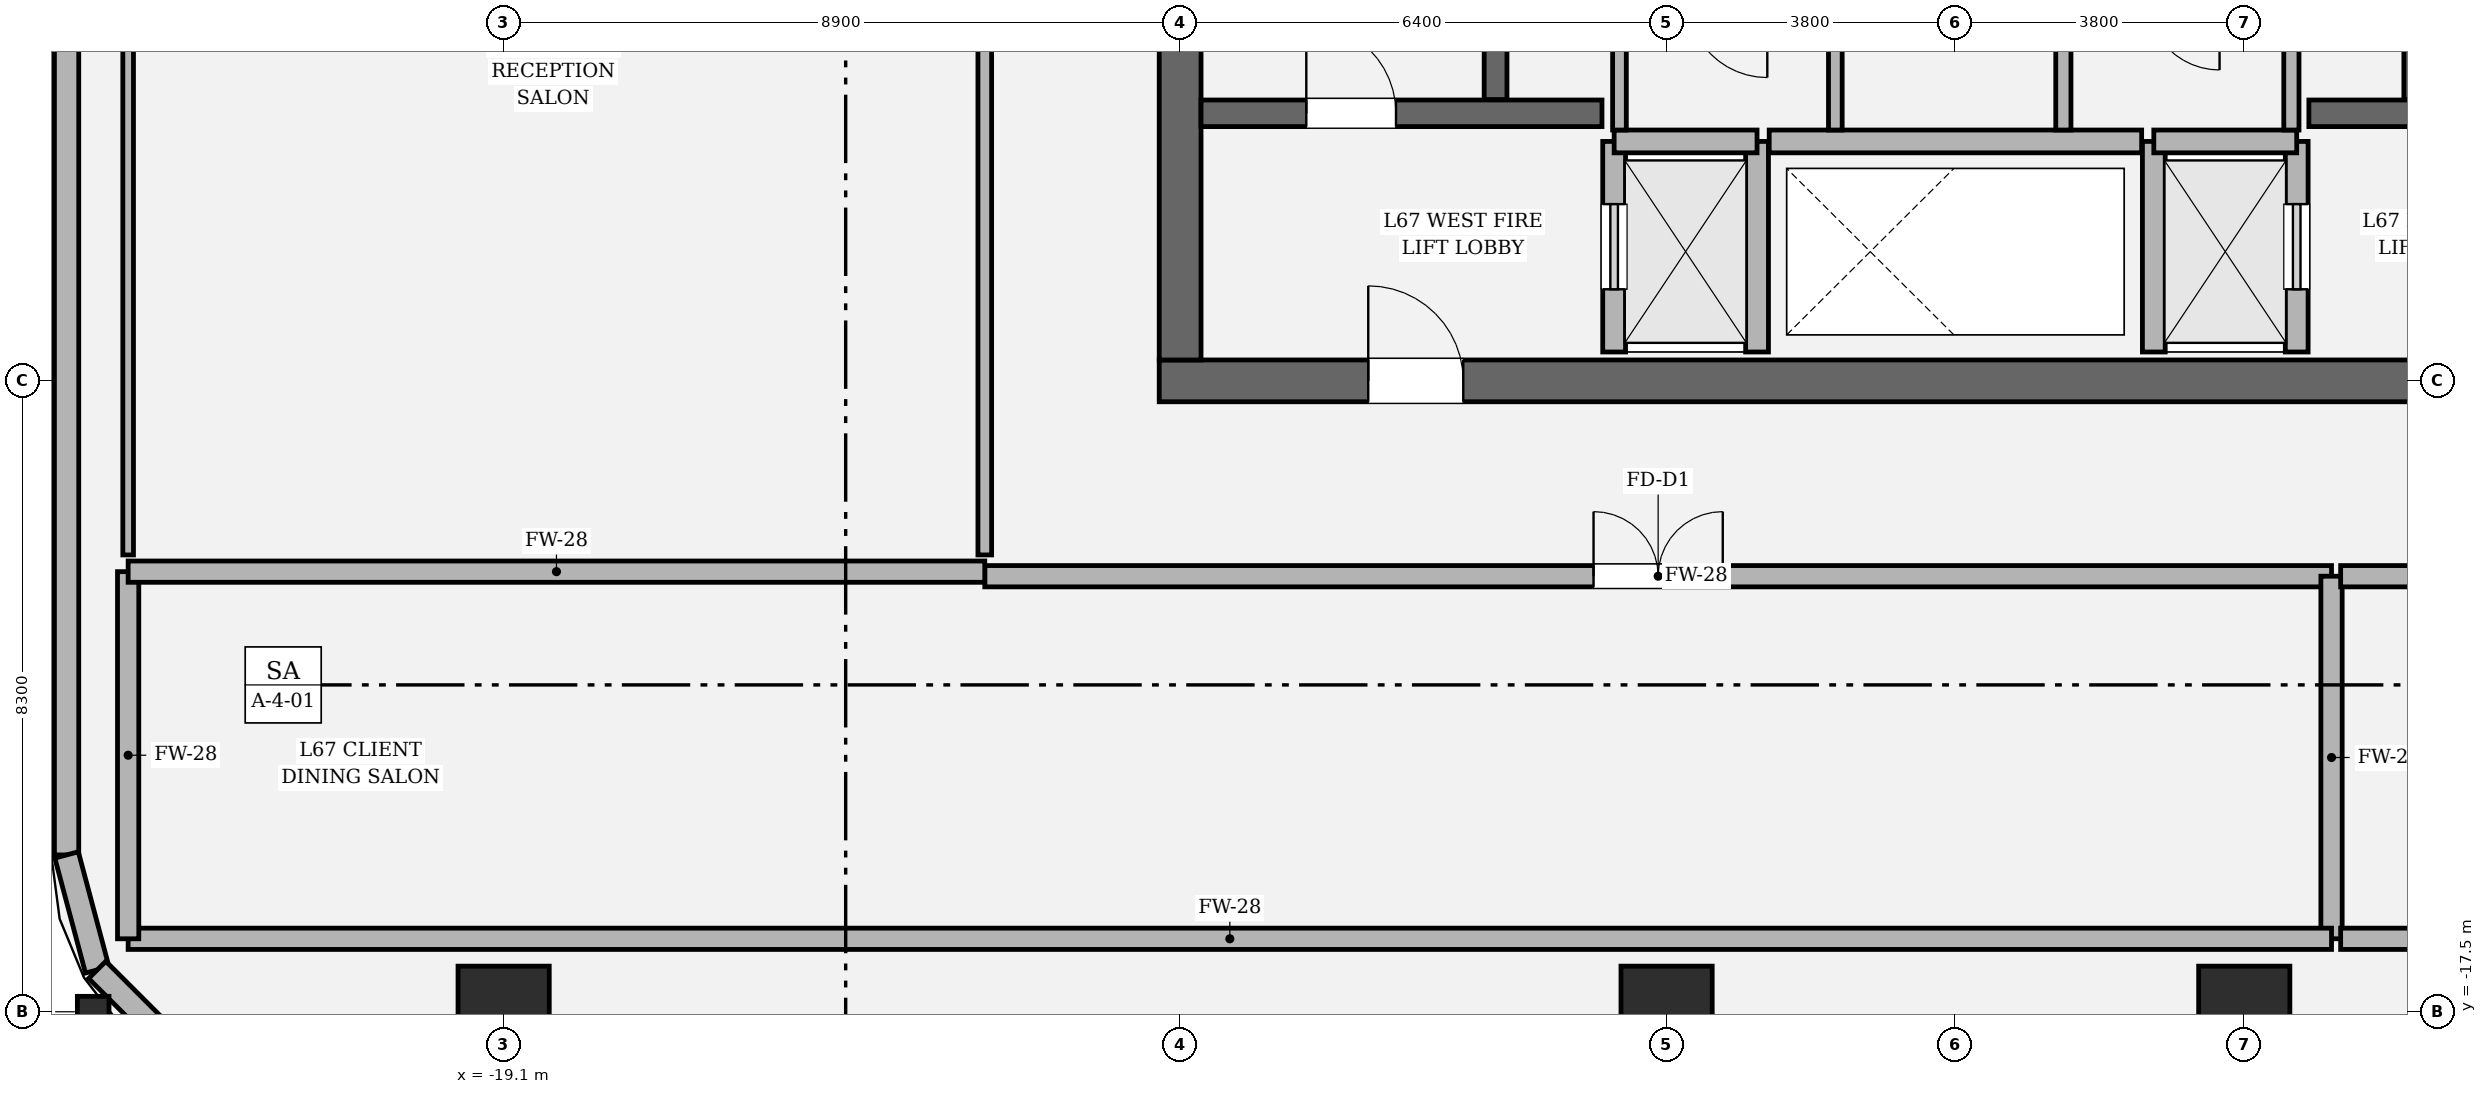
"""IFC4 building model, lengths in metres.
Left out: names, types, materials, properties, quantities, classifications, styles, units other than length and angle.
Written with IfcOpenShell. Run it as: python <this file> out.ifc"""

import sys

from ifc_helpers import new_model, si_unit, direction, frame, frame_2d, origin, origin_2d, place, context, subcontext, project, spatial, rectangle, hollow_rectangle, i_section, extrude, element, fill, save


model = new_model("IFC4")
c1 = context("Model", 3, precision=1e-05, world=origin(), true_north=direction((0.0, 1.0)))
c2 = subcontext(c1, "Body", "Model", "MODEL_VIEW")
j1 = project(units=[si_unit("LENGTHUNIT", "METRE"), si_unit("PLANEANGLEUNIT", "RADIAN")], contexts=[c1])
p1 = place(None, origin())
s1 = spatial("IfcSite", under=j1, at=p1, CompositionType="ELEMENT")
p2 = place(p1, origin())
s2 = spatial("IfcBuilding", under=s1, at=p2, CompositionType="ELEMENT")
p3 = place(p2, frame((0.0, 0.0, 283.8)))
s3 = spatial("IfcBuildingStorey", under=s2, at=p3, CompositionType="ELEMENT", Elevation=283.8)
p4 = place(p3, frame((10.475, -9.2, 0.0), z_axis=(0.0, 0.0, 1.0), x_axis=(-1.0, 0.0, 0.0)))
e1 = element("IfcWall", 1, at=p4, inside=s3, PredefinedType="SHEAR", context=c2, shape_type="SweptSolid", body=[
    extrude(rectangle(XDim=20.95, YDim=0.55, at=frame_2d((10.475, 0.0))), origin(), (0.0, 0.0, 1.0), 4.2),
])
p5 = place(p4, frame((2.75, 0.0, 0.0)))
e2 = element("IfcOpeningElement", 2, at=p5, cuts=e1, PredefinedType="OPENING", context=c2, shape_type="SweptSolid", body=[
    extrude(rectangle(XDim=1.25, YDim=2.25, at=frame_2d((0.625, 1.125))), frame((0.0, 0.285, 0.0), z_axis=(0.0, -1.0, 0.0), x_axis=(1.0, 0.0, 0.0)), (0.0, 0.0, 1.0), 0.57),
])
p6 = place(p4, frame((16.95, 0.0, 0.0)))
e3 = element("IfcOpeningElement", 3, at=p6, cuts=e1, PredefinedType="OPENING", context=c2, shape_type="SweptSolid", body=[
    extrude(rectangle(XDim=1.25, YDim=2.25, at=frame_2d((0.625, 1.125))), frame((0.0, 0.285, 0.0), z_axis=(0.0, -1.0, 0.0), x_axis=(1.0, 0.0, 0.0)), (0.0, 0.0, 1.0), 0.57),
])
p7 = place(p3, frame((-10.2, -8.925, 0.0), z_axis=(0.0, 0.0, 1.0), x_axis=(0.0, 1.0, 0.0)))
e4 = element("IfcWall", 4, at=p7, inside=s3, PredefinedType="SHEAR", context=c2, shape_type="SweptSolid", body=[
    extrude(rectangle(XDim=17.85, YDim=0.55, at=frame_2d((8.925, 0.0))), origin(), (0.0, 0.0, 1.0), 4.2),
])
p8 = place(p7, frame((12.715, 0.0, 0.0)))
e5 = element("IfcOpeningElement", 5, at=p8, cuts=e4, PredefinedType="OPENING", context=c2, shape_type="SweptSolid", body=[
    extrude(rectangle(XDim=1.18, YDim=2.2, at=frame_2d((0.59, 1.1))), frame((0.0, 0.285, 0.0), z_axis=(0.0, -1.0, 0.0), x_axis=(1.0, 0.0, 0.0)), (0.0, 0.0, 1.0), 0.57),
])
for number, where, z_axis, x_axis in (
    (6, (-6.05, -5.5, 0.0), (0.0, 0.0, 1.0), (0.0, 1.0, 0.0)),
    (7, (6.05, 3.45, 0.0), (0.0, 0.0, 1.0), (0.0, -1.0, 0.0)),
):
    element("IfcWall", number, at=place(p3, frame(where, z_axis=z_axis, x_axis=x_axis)), inside=s3, PredefinedType="SOLIDWALL", context=c2, shape_type="SweptSolid", body=[
        extrude(rectangle(XDim=8.95, YDim=0.3, at=frame_2d((4.475, 0.0))), origin(), (0.0, 0.0, 1.0), 4.2),
    ])
p9 = place(p3, frame((-9.925, -5.68, 0.0), z_axis=(0.0, 0.0, 1.0), x_axis=(1.0, 0.0, 0.0)))
e8 = element("IfcWall", 8, at=p9, inside=s3, PredefinedType="SOLIDWALL", context=c2, shape_type="SweptSolid", body=[
    extrude(rectangle(XDim=5.275, YDim=0.35, at=frame_2d((2.638, 0.0))), origin(), (0.0, 0.0, 1.0), 4.2),
])
p10 = place(p9, frame((1.385, 0.0, 0.0)))
e9 = element("IfcOpeningElement", 9, at=p10, cuts=e8, PredefinedType="OPENING", context=c2, shape_type="SweptSolid", body=[
    extrude(rectangle(XDim=1.18, YDim=2.2, at=frame_2d((0.59, 1.1))), frame((0.0, 0.185, 0.0), z_axis=(0.0, -1.0, 0.0), x_axis=(1.0, 0.0, 0.0)), (0.0, 0.0, 1.0), 0.37),
])
p11 = place(p3, frame((4.65, -5.68, 0.0), z_axis=(0.0, 0.0, 1.0), x_axis=(1.0, 0.0, 0.0)))
e10 = element("IfcWall", 10, at=p11, inside=s3, PredefinedType="SOLIDWALL", context=c2, shape_type="SweptSolid", body=[
    extrude(rectangle(XDim=5.275, YDim=0.35, at=frame_2d((2.638, 0.0))), origin(), (0.0, 0.0, 1.0), 4.2),
])
p12 = place(p11, frame((2.71, 0.0, 0.0)))
e11 = element("IfcOpeningElement", 11, at=p12, cuts=e10, PredefinedType="OPENING", context=c2, shape_type="SweptSolid", body=[
    extrude(rectangle(XDim=1.18, YDim=2.2, at=frame_2d((0.59, 1.1))), frame((0.0, 0.185, 0.0), z_axis=(0.0, -1.0, 0.0), x_axis=(1.0, 0.0, 0.0)), (0.0, 0.0, 1.0), 0.37),
])
for number, where, z_axis, x_axis in (
    (12, (-19.1, -17.5, 0.0), (0.0, 0.0, 1.0), (1.0, 0.0, 0.0)),
    (13, (-3.8, -17.5, 0.0), (0.0, 0.0, 1.0), (1.0, 0.0, 0.0)),
    (14, (3.8, -17.5, 0.0), (0.0, 0.0, 1.0), (1.0, 0.0, 0.0)),
):
    element("IfcColumn", number, at=place(p3, frame(where, z_axis=z_axis, x_axis=x_axis)), inside=s3, PredefinedType="COLUMN", context=c2, shape_type="SweptSolid", body=[
        extrude(hollow_rectangle(XDim=1.2, YDim=1.2, WallThickness=0.035, at=origin_2d()), origin(), (0.0, 0.0, 1.0), 4.2),
    ])
p13 = place(p3, frame((-24.5, -17.5, 0.0), z_axis=(0.0, 0.0, 1.0), x_axis=(0.0, 1.0, 0.0)))
e15 = element("IfcColumn", 15, at=p13, inside=s3, PredefinedType="COLUMN", context=c2, shape_type="SweptSolid", body=[
    extrude(i_section(OverallWidth=0.406, OverallDepth=0.416, WebThickness=0.029, FlangeThickness=0.048, FilletRadius=0.018, at=origin_2d()), origin(), (0.0, 0.0, 1.0), 4.198),
])
p14 = place(p3, frame((-24.85, -2.75, 0.0), z_axis=(0.0, 0.0, 1.0), x_axis=(0.0, -1.0, 0.0)))
e16 = element("IfcWall", 16, at=p14, inside=s3, PredefinedType="SOLIDWALL", context=c2, shape_type="SweptSolid", body=[
    extrude(rectangle(XDim=12.687, YDim=0.32, at=frame_2d((6.344, 0.0))), origin(), (0.0, 0.0, 1.0), 2.714),
])
p15 = place(p3, frame((-24.85, -15.437, 0.0), z_axis=(0.0, 0.0, 1.0), x_axis=(0.257847112249, -0.966185730957, 0.0)))
e17 = element("IfcWall", 17, at=p15, inside=s3, PredefinedType="SOLIDWALL", context=c2, shape_type="SweptSolid", body=[
    extrude(rectangle(XDim=1.565, YDim=0.32, at=frame_2d((0.783, 0.0))), origin(), (0.0, 0.0, 1.0), 2.714),
])
p16 = place(p3, frame((-24.447, -16.949, 0.0), z_axis=(0.0, 0.0, 1.0), x_axis=(0.707106781187, -0.707106781187, 0.0)))
e18 = element("IfcWall", 18, at=p16, inside=s3, PredefinedType="SOLIDWALL", context=c2, shape_type="SweptSolid", body=[
    extrude(rectangle(XDim=1.552, YDim=0.32, at=frame_2d((0.776, 0.0))), origin(), (0.0, 0.0, 1.0), 2.674),
])
p17 = place(p3, frame((-4.49, -8.82, 0.0), z_axis=(0.0, 0.0, 1.0), x_axis=(0.0, 1.0, 0.0)))
e19 = element("IfcWall", 19, at=p17, inside=s3, PredefinedType="SOLIDWALL", context=c2, shape_type="SweptSolid", body=[
    extrude(rectangle(XDim=2.77, YDim=0.3, at=frame_2d((1.385, 0.0))), origin(), (0.0, 0.0, 1.0), 4.0),
])
p18 = place(p17, frame((0.825, 0.0, 0.0)))
e20 = element("IfcOpeningElement", 20, at=p18, cuts=e19, PredefinedType="OPENING", context=c2, shape_type="SweptSolid", body=[
    extrude(rectangle(XDim=1.12, YDim=2.25, at=frame_2d((0.56, 1.125))), frame((0.0, 0.16, 0.0), z_axis=(0.0, -1.0, 0.0), x_axis=(1.0, 0.0, 0.0)), (0.0, 0.0, 1.0), 0.32),
])
p19 = place(p3, frame((-2.61, -8.82, 0.0), z_axis=(0.0, 0.0, 1.0), x_axis=(0.0, 1.0, 0.0)))
e21 = element("IfcWall", 21, at=p19, inside=s3, PredefinedType="SOLIDWALL", context=c2, shape_type="SweptSolid", body=[
    extrude(rectangle(XDim=2.77, YDim=0.3, at=frame_2d((1.385, 0.0))), origin(), (0.0, 0.0, 1.0), 4.0),
])
p20 = place(p3, frame((-4.49, -6.05, 0.0), z_axis=(0.0, 0.0, 1.0), x_axis=(1.0, 0.0, 0.0)))
e22 = element("IfcWall", 22, at=p20, inside=s3, PredefinedType="SOLIDWALL", context=c2, shape_type="SweptSolid", body=[
    extrude(rectangle(XDim=1.88, YDim=0.3, at=frame_2d((0.94, 0.0))), origin(), (0.0, 0.0, 1.0), 4.0),
])
p21 = place(p3, frame((4.49, -8.82, 0.0), z_axis=(0.0, 0.0, 1.0), x_axis=(0.0, 1.0, 0.0)))
e23 = element("IfcWall", 23, at=p21, inside=s3, PredefinedType="SOLIDWALL", context=c2, shape_type="SweptSolid", body=[
    extrude(rectangle(XDim=2.77, YDim=0.3, at=frame_2d((1.385, 0.0))), origin(), (0.0, 0.0, 1.0), 4.0),
])
p22 = place(p21, frame((0.825, 0.0, 0.0)))
e24 = element("IfcOpeningElement", 24, at=p22, cuts=e23, PredefinedType="OPENING", context=c2, shape_type="SweptSolid", body=[
    extrude(rectangle(XDim=1.12, YDim=2.25, at=frame_2d((0.56, 1.125))), frame((0.0, 0.16, 0.0), z_axis=(0.0, -1.0, 0.0), x_axis=(1.0, 0.0, 0.0)), (0.0, 0.0, 1.0), 0.32),
])
p23 = place(p3, frame((2.61, -8.82, 0.0), z_axis=(0.0, 0.0, 1.0), x_axis=(0.0, 1.0, 0.0)))
e25 = element("IfcWall", 25, at=p23, inside=s3, PredefinedType="SOLIDWALL", context=c2, shape_type="SweptSolid", body=[
    extrude(rectangle(XDim=2.77, YDim=0.3, at=frame_2d((1.385, 0.0))), origin(), (0.0, 0.0, 1.0), 4.0),
])
p24 = place(p3, frame((2.61, -6.05, 0.0), z_axis=(0.0, 0.0, 1.0), x_axis=(1.0, 0.0, 0.0)))
e26 = element("IfcWall", 26, at=p24, inside=s3, PredefinedType="SOLIDWALL", context=c2, shape_type="SweptSolid", body=[
    extrude(rectangle(XDim=1.88, YDim=0.3, at=frame_2d((0.94, 0.0))), origin(), (0.0, 0.0, 1.0), 4.0),
])
p25 = place(p3, frame((-2.45, -6.05, 0.0), z_axis=(0.0, 0.0, 1.0), x_axis=(1.0, 0.0, 0.0)))
e27 = element("IfcWall", 27, at=p25, inside=s3, PredefinedType="SOLIDWALL", context=c2, shape_type="SweptSolid", body=[
    extrude(rectangle(XDim=4.9, YDim=0.3, at=frame_2d((2.45, 0.0))), origin(), (0.0, 0.0, 1.0), 4.0),
])
for number, where, z_axis, x_axis in (
    (28, (-1.58, -5.9, 0.0), (0.0, 0.0, 1.0), (0.0, 1.0, 0.0)),
    (29, (-4.42, -4.16, 0.0), (0.0, 0.0, 1.0), (0.0, -1.0, 0.0)),
):
    element("IfcWall", number, at=place(p3, frame(where, z_axis=z_axis, x_axis=x_axis)), inside=s3, PredefinedType="PARTITIONING", context=c2, shape_type="SweptSolid", body=[
        extrude(rectangle(XDim=1.74, YDim=0.18, at=frame_2d((0.87, 0.0))), origin(), (0.0, 0.0, 1.0), 4.0),
    ])
for number, where, z_axis, x_axis in (
    (30, (1.42, -5.9, 0.0), (0.0, 0.0, 1.0), (0.0, 1.0, 0.0)),
    (31, (4.42, -5.9, 0.0), (0.0, 0.0, 1.0), (0.0, 1.0, 0.0)),
):
    element("IfcWall", number, at=place(p3, frame(where, z_axis=z_axis, x_axis=x_axis)), inside=s3, PredefinedType="SOLIDWALL", context=c2, shape_type="SweptSolid", body=[
        extrude(rectangle(XDim=1.74, YDim=0.2, at=frame_2d((0.87, 0.0))), origin(), (0.0, 0.0, 1.0), 4.0),
    ])
p26 = place(p3, frame((-12.77, -11.77, 0.0), z_axis=(0.0, 0.0, 1.0), x_axis=(1.0, 0.0, 0.0)))
e32 = element("IfcWall", 32, at=p26, inside=s3, PredefinedType="SOLIDWALL", context=c2, shape_type="SweptSolid", body=[
    extrude(rectangle(XDim=17.718, YDim=0.28, at=frame_2d((8.859, 0.0))), origin(), (0.0, 0.0, 1.0), 3.394),
])
p27 = place(p26, frame((8.009, 0.0, 0.0)))
e33 = element("IfcOpeningElement", 33, at=p27, cuts=e32, PredefinedType="OPENING", context=c2, shape_type="SweptSolid", body=[
    extrude(rectangle(XDim=1.7, YDim=2.3, at=frame_2d((0.85, 1.15))), frame((0.0, 0.15, 0.0), z_axis=(0.0, -1.0, 0.0), x_axis=(1.0, 0.0, 0.0)), (0.0, 0.0, 1.0), 0.3),
])
p28 = place(p3, frame((4.948, -11.77, 0.0), z_axis=(0.0, 0.0, 1.0), x_axis=(0.0, -1.0, 0.0)))
e34 = element("IfcWall", 34, at=p28, inside=s3, PredefinedType="SOLIDWALL", context=c2, shape_type="SweptSolid", body=[
    extrude(rectangle(XDim=4.77, YDim=0.28, at=frame_2d((2.385, 0.0))), origin(), (0.0, 0.0, 1.0), 4.0),
])
p29 = place(p3, frame((4.948, -16.54, 0.0), z_axis=(0.0, 0.0, 1.0), x_axis=(-1.0, 0.0, 0.0)))
e35 = element("IfcWall", 35, at=p29, inside=s3, PredefinedType="SOLIDWALL", context=c2, shape_type="SweptSolid", body=[
    extrude(rectangle(XDim=28.988, YDim=0.28, at=frame_2d((14.494, 0.0))), origin(), (0.0, 0.0, 1.0), 3.394),
])
p30 = place(p3, frame((-24.04, -16.54, 0.0), z_axis=(0.0, 0.0, 1.0), x_axis=(0.0, 1.0, 0.0)))
e36 = element("IfcWall", 36, at=p30, inside=s3, PredefinedType="SOLIDWALL", context=c2, shape_type="SweptSolid", body=[
    extrude(rectangle(XDim=4.83, YDim=0.28, at=frame_2d((2.415, 0.0))), origin(), (0.0, 0.0, 1.0), 4.0),
])
p31 = place(p3, frame((-24.04, -11.71, 0.0), z_axis=(0.0, 0.0, 1.0), x_axis=(1.0, 0.0, 0.0)))
e37 = element("IfcWall", 37, at=p31, inside=s3, PredefinedType="SOLIDWALL", context=c2, shape_type="SweptSolid", body=[
    extrude(rectangle(XDim=11.27, YDim=0.28, at=frame_2d((5.635, 0.0))), origin(), (0.0, 0.0, 1.0), 3.394),
])
p32 = place(p3, frame((18.14, -16.54, 0.0), z_axis=(0.0, 0.0, 1.0), x_axis=(-1.0, 0.0, 0.0)))
e38 = element("IfcWall", 38, at=p32, inside=s3, PredefinedType="SOLIDWALL", context=c2, shape_type="SweptSolid", body=[
    extrude(rectangle(XDim=13.072, YDim=0.28, at=frame_2d((6.536, 0.0))), origin(), (0.0, 0.0, 1.0), 3.394),
])
p33 = place(p3, frame((5.068, -11.77, 0.0), z_axis=(0.0, 0.0, 1.0), x_axis=(1.0, 0.0, 0.0)))
e39 = element("IfcWall", 39, at=p33, inside=s3, PredefinedType="SOLIDWALL", context=c2, shape_type="SweptSolid", body=[
    extrude(rectangle(XDim=7.702, YDim=0.28, at=frame_2d((3.851, 0.0))), origin(), (0.0, 0.0, 1.0), 3.394),
])
p34 = place(p33, frame((3.001, 0.0, 0.0)))
e40 = element("IfcOpeningElement", 40, at=p34, cuts=e39, PredefinedType="OPENING", context=c2, shape_type="SweptSolid", body=[
    extrude(rectangle(XDim=1.7, YDim=2.3, at=frame_2d((0.85, 1.15))), frame((0.0, 0.15, 0.0), z_axis=(0.0, -1.0, 0.0), x_axis=(1.0, 0.0, 0.0)), (0.0, 0.0, 1.0), 0.3),
])
p35 = place(p3, frame((-24.04, -11.49, 0.0), z_axis=(0.0, 0.0, 1.0), x_axis=(0.0, 1.0, 0.0)))
e41 = element("IfcWall", 41, at=p35, inside=s3, PredefinedType="PARTITIONING", context=c2, shape_type="SweptSolid", body=[
    extrude(rectangle(XDim=22.98, YDim=0.14, at=frame_2d((11.49, 0.0))), origin(), (0.0, 0.0, 1.0), 2.674),
])
p36 = place(p3, frame((-12.77, 11.49, 0.0), z_axis=(0.0, 0.0, 1.0), x_axis=(0.0, -1.0, 0.0)))
e42 = element("IfcWall", 42, at=p36, inside=s3, PredefinedType="PARTITIONING", context=c2, shape_type="SweptSolid", body=[
    extrude(rectangle(XDim=22.98, YDim=0.18, at=frame_2d((11.49, 0.0))), origin(), (0.0, 0.0, 1.0), 3.394),
])
p37 = place(p36, frame((10.965, 0.0, 0.0)))
e43 = element("IfcOpeningElement", 43, at=p37, cuts=e42, PredefinedType="OPENING", context=c2, shape_type="SweptSolid", body=[
    extrude(rectangle(XDim=1.05, YDim=2.2, at=frame_2d((0.525, 1.1))), frame((0.0, 0.1, 0.0), z_axis=(0.0, -1.0, 0.0), x_axis=(1.0, 0.0, 0.0)), (0.0, 0.0, 1.0), 0.2),
])
p38 = place(p10, origin())
e44 = element("IfcDoor", 44, at=p38, inside=s3, OperationType="SINGLE_SWING_LEFT", PredefinedType="DOOR", context=c2, shape_type="SweptSolid", body=[
    extrude(rectangle(XDim=1.18, YDim=2.2, at=frame_2d((0.59, 1.1))), frame((0.0, 0.025, 0.0), z_axis=(0.0, -1.0, 0.0), x_axis=(1.0, 0.0, 0.0)), (0.0, 0.0, 1.0), 0.05),
])
fill(e9, e44)
p39 = place(p6, origin())
e45 = element("IfcDoor", 45, at=p39, inside=s3, OperationType="SINGLE_SWING_RIGHT", PredefinedType="DOOR", context=c2, shape_type="SweptSolid", body=[
    extrude(rectangle(XDim=1.25, YDim=2.25, at=frame_2d((0.625, 1.125))), frame((0.0, 0.025, 0.0), z_axis=(0.0, -1.0, 0.0), x_axis=(1.0, 0.0, 0.0)), (0.0, 0.0, 1.0), 0.05),
])
fill(e3, e45)
p40 = place(p18, origin())
e46 = element("IfcDoor", 46, at=p40, inside=s3, OperationType="SLIDING_TO_LEFT", PredefinedType="DOOR", context=c2, shape_type="SweptSolid", body=[
    extrude(rectangle(XDim=1.12, YDim=2.25, at=frame_2d((0.56, 1.125))), frame((0.0, 0.025, 0.0), z_axis=(0.0, -1.0, 0.0), x_axis=(1.0, 0.0, 0.0)), (0.0, 0.0, 1.0), 0.05),
])
fill(e20, e46)
p41 = place(p22, origin())
e47 = element("IfcDoor", 47, at=p41, inside=s3, OperationType="SLIDING_TO_RIGHT", PredefinedType="DOOR", context=c2, shape_type="SweptSolid", body=[
    extrude(rectangle(XDim=1.12, YDim=2.25, at=frame_2d((0.56, 1.125))), frame((0.0, 0.025, 0.0), z_axis=(0.0, -1.0, 0.0), x_axis=(1.0, 0.0, 0.0)), (0.0, 0.0, 1.0), 0.05),
])
fill(e24, e47)
p42 = place(p27, origin())
e48 = element("IfcDoor", 48, at=p42, inside=s3, OperationType="DOUBLE_DOOR_SINGLE_SWING", PredefinedType="DOOR", context=c2, shape_type="SweptSolid", body=[
    extrude(rectangle(XDim=1.7, YDim=2.3, at=frame_2d((0.85, 1.15))), frame((0.0, 0.025, 0.0), z_axis=(0.0, -1.0, 0.0), x_axis=(1.0, 0.0, 0.0)), (0.0, 0.0, 1.0), 0.05),
])
fill(e33, e48)
save(model, sys.argv[1])
